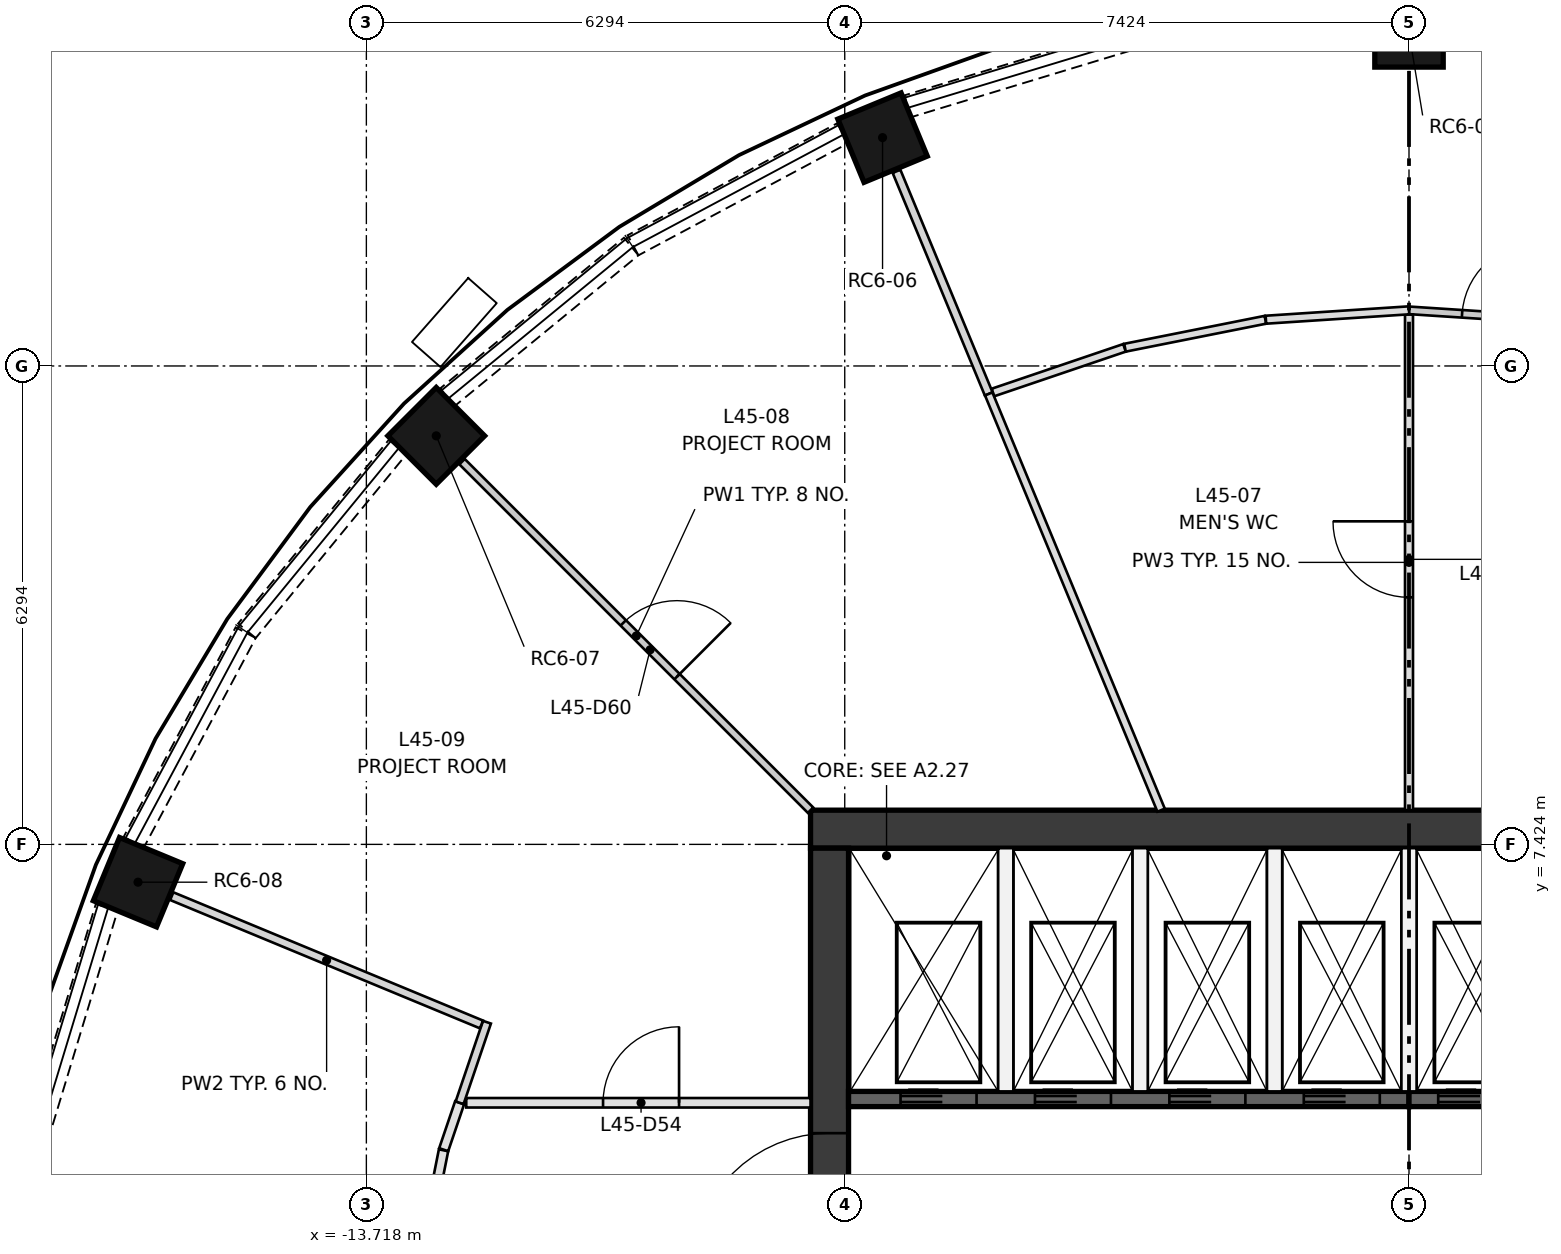
"""IFC4 building model, lengths in metres.
Left out: names, types, materials, properties, quantities, classifications, styles, units other than length and angle.
Written with IfcOpenShell. Run it as: python <this file> out.ifc"""

import sys

from ifc_helpers import new_model, si_unit, direction, frame, frame_2d, origin, origin_2d, place, context, subcontext, project, spatial, rectangle, extrude, element, fill, save


model = new_model("IFC4")
c1 = context("Model", 3, precision=1e-05, world=origin(), true_north=direction((0.0, 1.0)))
c2 = subcontext(c1, "Body", "Model", "MODEL_VIEW")
j1 = project(units=[si_unit("LENGTHUNIT", "METRE"), si_unit("PLANEANGLEUNIT", "RADIAN")], contexts=[c1])
p1 = place(None, origin())
s1 = spatial("IfcSite", under=j1, at=p1, CompositionType="ELEMENT")
p2 = place(p1, origin())
s2 = spatial("IfcBuilding", under=s1, at=p2, CompositionType="ELEMENT")
p3 = place(p2, frame((0.0, 0.0, 170.9)))
s3 = spatial("IfcBuildingStorey", under=s2, at=p3, CompositionType="ELEMENT", Elevation=170.9)
for number, where, z_axis, x_axis in (
    (1, (0.0, 18.1, 0.0), (0.0, 0.0, 1.0), (0.0, 1.0, 0.0)),
    (2, (-6.927, 16.722, 0.0), (0.0, 0.0, 1.0), (-0.383, 0.924, 0.0)),
    (3, (-12.799, 12.799, 0.0), (0.0, 0.0, 1.0), (-0.707, 0.707, 0.0)),
    (4, (-16.722, 6.927, 0.0), (0.0, 0.0, 1.0), (-0.924, 0.383, 0.0)),
):
    element("IfcColumn", number, at=place(p3, frame(where, z_axis=z_axis, x_axis=x_axis)), inside=s3, PredefinedType="COLUMN", context=c2, shape_type="SweptSolid", body=[
        extrude(rectangle(XDim=0.9, YDim=0.9, at=origin_2d()), origin(), (0.0, 0.0, 1.0), 3.35),
    ])
p4 = place(p3, frame((-7.874, 7.624, 0.0), z_axis=(0.0, 0.0, 1.0), x_axis=(1.0, 0.0, 0.0)))
e5 = element("IfcWall", 5, at=p4, inside=s3, PredefinedType="SHEAR", context=c2, shape_type="SweptSolid", body=[
    extrude(rectangle(XDim=15.748, YDim=0.5, at=frame_2d((7.874, 0.0))), origin(), (0.0, 0.0, 1.0), 3.35),
])
p5 = place(p3, frame((-7.624, -7.374, 0.0), z_axis=(0.0, 0.0, 1.0), x_axis=(0.0, 1.0, 0.0)))
e6 = element("IfcWall", 6, at=p5, inside=s3, PredefinedType="SHEAR", context=c2, shape_type="SweptSolid", body=[
    extrude(rectangle(XDim=14.748, YDim=0.5, at=frame_2d((7.374, 0.0))), origin(), (0.0, 0.0, 1.0), 3.35),
])
p6 = place(p5, frame((6.874, 0.0, 0.0)))
e7 = element("IfcOpeningElement", 7, at=p6, cuts=e6, PredefinedType="OPENING", context=c2, shape_type="SweptSolid", body=[
    extrude(rectangle(XDim=1.0, YDim=2.1, at=frame_2d((0.5, 1.05))), frame((0.0, 0.26, 0.0), z_axis=(0.0, -1.0, 0.0), x_axis=(1.0, 0.0, 0.0)), (0.0, 0.0, 1.0), 0.52),
])
p7 = place(p5, frame((3.75, 0.0, 0.0)))
e8 = element("IfcOpeningElement", 8, at=p7, cuts=e6, PredefinedType="OPENING", context=c2, shape_type="SweptSolid", body=[
    extrude(rectangle(XDim=1.8, YDim=2.1, at=frame_2d((0.9, 1.05))), frame((0.0, 0.26, 0.0), z_axis=(0.0, -1.0, 0.0), x_axis=(1.0, 0.0, 0.0)), (0.0, 0.0, 1.0), 0.52),
])
p8 = place(p5, frame((9.198, 0.0, 0.0)))
e9 = element("IfcOpeningElement", 9, at=p8, cuts=e6, PredefinedType="OPENING", context=c2, shape_type="SweptSolid", body=[
    extrude(rectangle(XDim=1.8, YDim=2.1, at=frame_2d((0.9, 1.05))), frame((0.0, 0.26, 0.0), z_axis=(0.0, -1.0, 0.0), x_axis=(1.0, 0.0, 0.0)), (0.0, 0.0, 1.0), 0.52),
])
p9 = place(p3, frame((-7.374, 4.074, 0.0), z_axis=(0.0, 0.0, 1.0), x_axis=(1.0, 0.0, 0.0)))
e10 = element("IfcWall", 10, at=p9, inside=s3, PredefinedType="SHEAR", context=c2, shape_type="SweptSolid", body=[
    extrude(rectangle(XDim=7.374, YDim=0.2, at=frame_2d((3.687, 0.0))), origin(), (0.0, 0.0, 1.0), 3.0),
])
p10 = place(p9, frame((0.684, 0.0, 0.0)))
e11 = element("IfcOpeningElement", 11, at=p10, cuts=e10, PredefinedType="OPENING", context=c2, shape_type="SweptSolid", body=[
    extrude(rectangle(XDim=1.0, YDim=2.1, at=frame_2d((0.5, 1.05))), frame((0.0, 0.11, 0.0), z_axis=(0.0, -1.0, 0.0), x_axis=(1.0, 0.0, 0.0)), (0.0, 0.0, 1.0), 0.22),
])
p11 = place(p9, frame((2.453, 0.0, 0.0)))
e12 = element("IfcOpeningElement", 12, at=p11, cuts=e10, PredefinedType="OPENING", context=c2, shape_type="SweptSolid", body=[
    extrude(rectangle(XDim=1.0, YDim=2.1, at=frame_2d((0.5, 1.05))), frame((0.0, 0.11, 0.0), z_axis=(0.0, -1.0, 0.0), x_axis=(1.0, 0.0, 0.0)), (0.0, 0.0, 1.0), 0.22),
])
p12 = place(p9, frame((4.221, 0.0, 0.0)))
e13 = element("IfcOpeningElement", 13, at=p12, cuts=e10, PredefinedType="OPENING", context=c2, shape_type="SweptSolid", body=[
    extrude(rectangle(XDim=1.0, YDim=2.1, at=frame_2d((0.5, 1.05))), frame((0.0, 0.11, 0.0), z_axis=(0.0, -1.0, 0.0), x_axis=(1.0, 0.0, 0.0)), (0.0, 0.0, 1.0), 0.22),
])
p13 = place(p9, frame((5.99, 0.0, 0.0)))
e14 = element("IfcOpeningElement", 14, at=p13, cuts=e10, PredefinedType="OPENING", context=c2, shape_type="SweptSolid", body=[
    extrude(rectangle(XDim=1.0, YDim=2.1, at=frame_2d((0.5, 1.05))), frame((0.0, 0.11, 0.0), z_axis=(0.0, -1.0, 0.0), x_axis=(1.0, 0.0, 0.0)), (0.0, 0.0, 1.0), 0.22),
])
p14 = place(p3, frame((0.0, 4.074, 0.0), z_axis=(0.0, 0.0, 1.0), x_axis=(1.0, 0.0, 0.0)))
e15 = element("IfcWall", 15, at=p14, inside=s3, PredefinedType="SHEAR", context=c2, shape_type="SweptSolid", body=[
    extrude(rectangle(XDim=7.374, YDim=0.2, at=frame_2d((3.687, 0.0))), origin(), (0.0, 0.0, 1.0), 3.0),
])
p15 = place(p14, frame((0.384, 0.0, 0.0)))
e16 = element("IfcOpeningElement", 16, at=p15, cuts=e15, PredefinedType="OPENING", context=c2, shape_type="SweptSolid", body=[
    extrude(rectangle(XDim=1.0, YDim=2.1, at=frame_2d((0.5, 1.05))), frame((0.0, 0.11, 0.0), z_axis=(0.0, -1.0, 0.0), x_axis=(1.0, 0.0, 0.0)), (0.0, 0.0, 1.0), 0.22),
])
p16 = place(p14, frame((2.153, 0.0, 0.0)))
e17 = element("IfcOpeningElement", 17, at=p16, cuts=e15, PredefinedType="OPENING", context=c2, shape_type="SweptSolid", body=[
    extrude(rectangle(XDim=1.0, YDim=2.1, at=frame_2d((0.5, 1.05))), frame((0.0, 0.11, 0.0), z_axis=(0.0, -1.0, 0.0), x_axis=(1.0, 0.0, 0.0)), (0.0, 0.0, 1.0), 0.22),
])
p17 = place(p14, frame((3.921, 0.0, 0.0)))
e18 = element("IfcOpeningElement", 18, at=p17, cuts=e15, PredefinedType="OPENING", context=c2, shape_type="SweptSolid", body=[
    extrude(rectangle(XDim=1.0, YDim=2.1, at=frame_2d((0.5, 1.05))), frame((0.0, 0.11, 0.0), z_axis=(0.0, -1.0, 0.0), x_axis=(1.0, 0.0, 0.0)), (0.0, 0.0, 1.0), 0.22),
])
p18 = place(p14, frame((5.79, 0.0, 0.0)))
e19 = element("IfcOpeningElement", 19, at=p18, cuts=e15, PredefinedType="OPENING", context=c2, shape_type="SweptSolid", body=[
    extrude(rectangle(XDim=0.8, YDim=2.1, at=frame_2d((0.4, 1.05))), frame((0.0, 0.11, 0.0), z_axis=(0.0, -1.0, 0.0), x_axis=(1.0, 0.0, 0.0)), (0.0, 0.0, 1.0), 0.22),
])
for number, where, z_axis, x_axis in (
    (20, (-5.305, 4.174, 0.0), (0.0, 0.0, 1.0), (0.0, 1.0, 0.0)),
    (21, (-3.537, 4.174, 0.0), (0.0, 0.0, 1.0), (0.0, 1.0, 0.0)),
    (22, (-1.769, 4.174, 0.0), (0.0, 0.0, 1.0), (0.0, 1.0, 0.0)),
    (23, (0.0, 4.174, 0.0), (0.0, 0.0, 1.0), (0.0, 1.0, 0.0)),
):
    element("IfcWall", number, at=place(p3, frame(where, z_axis=z_axis, x_axis=x_axis)), inside=s3, PredefinedType="PARTITIONING", context=c2, shape_type="SweptSolid", body=[
        extrude(rectangle(XDim=3.2, YDim=0.2, at=frame_2d((1.6, 0.0))), origin(), (0.0, 0.0, 1.0), 3.0),
    ])
p19 = place(p3, frame((-3.604, 18.042, 0.0), z_axis=(0.0, 0.0, 1.0), x_axis=(-0.957001416136, -0.290083245834, 0.0)))
e24 = element("IfcWall", 24, at=p19, inside=s3, PredefinedType="SOLIDWALL", context=c2, shape_type="SweptSolid", body=[
    extrude(rectangle(XDim=3.127, YDim=0.3, at=frame_2d((1.563, 0.0))), origin(), (0.0, 0.0, 1.0), 0.9),
])
p20 = place(p3, frame((-7.452, 16.779, 0.0), z_axis=(0.0, 0.0, 1.0), x_axis=(-0.882024038027, -0.47120441036, 0.0)))
e25 = element("IfcWall", 25, at=p20, inside=s3, PredefinedType="SOLIDWALL", context=c2, shape_type="SweptSolid", body=[
    extrude(rectangle(XDim=3.125, YDim=0.3, at=frame_2d((1.562, 0.0))), origin(), (0.0, 0.0, 1.0), 0.9),
])
for number, where, z_axis, x_axis in (
    (26, (-10.234, 15.29, 0.0), (0.0, 0.0, 1.0), (-0.773, -0.634, 0.0)),
    (27, (-13.306, 12.651, 0.0), (0.0, 0.0, 1.0), (-0.634, -0.773, 0.0)),
):
    element("IfcWall", number, at=place(p3, frame(where, z_axis=z_axis, x_axis=x_axis)), inside=s3, PredefinedType="SOLIDWALL", context=c2, shape_type="SweptSolid", body=[
        extrude(rectangle(XDim=3.127, YDim=0.3, at=frame_2d((1.563, 0.0))), origin(), (0.0, 0.0, 1.0), 0.9),
    ])
p21 = place(p3, frame((-15.306, 10.209, 0.0), z_axis=(0.0, 0.0, 1.0), x_axis=(-0.47120441036, -0.882024038027, 0.0)))
e28 = element("IfcWall", 28, at=p21, inside=s3, PredefinedType="SOLIDWALL", context=c2, shape_type="SweptSolid", body=[
    extrude(rectangle(XDim=3.125, YDim=0.3, at=frame_2d((1.562, 0.0))), origin(), (0.0, 0.0, 1.0), 0.9),
])
p22 = place(p3, frame((-17.135, 6.596, 0.0), z_axis=(0.0, 0.0, 1.0), x_axis=(-0.290083245834, -0.957001416136, 0.0)))
e29 = element("IfcWall", 29, at=p22, inside=s3, PredefinedType="SOLIDWALL", context=c2, shape_type="SweptSolid", body=[
    extrude(rectangle(XDim=3.127, YDim=0.3, at=frame_2d((1.563, 0.0))), origin(), (0.0, 0.0, 1.0), 0.9),
])
p23 = place(p3, frame((-12.404, 4.024, 0.0), z_axis=(0.0, 0.0, 1.0), x_axis=(1.0, 0.0, 0.0)))
e30 = element("IfcWall", 30, at=p23, inside=s3, PredefinedType="PARTITIONING", context=c2, shape_type="SweptSolid", body=[
    extrude(rectangle(XDim=4.53, YDim=0.125, at=frame_2d((2.265, 0.0))), origin(), (0.0, 0.0, 1.0), 3.0),
])
p24 = place(p23, frame((1.8, 0.0, 0.0)))
e31 = element("IfcOpeningElement", 31, at=p24, cuts=e30, PredefinedType="OPENING", context=c2, shape_type="SweptSolid", body=[
    extrude(rectangle(XDim=1.0, YDim=2.1, at=frame_2d((0.5, 1.05))), frame((0.0, 0.073, 0.0), z_axis=(0.0, -1.0, 0.0), x_axis=(1.0, 0.0, 0.0)), (0.0, 0.0, 1.0), 0.145),
])
p25 = place(p3, frame((-13.037, 1.72, 0.0), z_axis=(0.0, 0.0, 1.0), x_axis=(0.195101249107, 0.980783106806, 0.0)))
e32 = element("IfcWall", 32, at=p25, inside=s3, PredefinedType="PARTITIONING", context=c2, shape_type="SweptSolid", body=[
    extrude(rectangle(XDim=1.712, YDim=0.125, at=frame_2d((0.856, 0.0))), origin(), (0.0, 0.0, 1.0), 3.0),
])
p26 = place(p3, frame((-12.701, 3.407, 0.0), z_axis=(0.0, 0.0, 1.0), x_axis=(0.321506357846, 0.946907419902, 0.0)))
e33 = element("IfcWall", 33, at=p26, inside=s3, PredefinedType="PARTITIONING", context=c2, shape_type="SweptSolid", body=[
    extrude(rectangle(XDim=0.652, YDim=0.125, at=frame_2d((0.326, 0.0))), origin(), (0.0, 0.0, 1.0), 3.0),
])
p27 = place(p3, frame((0.0, 14.45, 0.0), z_axis=(0.0, 0.0, 1.0), x_axis=(0.997862900294, -0.065342422802, 0.0)))
e34 = element("IfcWall", 34, at=p27, inside=s3, PredefinedType="PARTITIONING", context=c2, shape_type="SweptSolid", body=[
    extrude(rectangle(XDim=1.887, YDim=0.1, at=frame_2d((0.943, 0.0))), origin(), (0.0, 0.0, 1.0), 3.0),
])
p28 = place(p27, frame((0.7, 0.0, 0.0)))
e35 = element("IfcOpeningElement", 35, at=p28, cuts=e34, PredefinedType="OPENING", context=c2, shape_type="SweptSolid", body=[
    extrude(rectangle(XDim=1.0, YDim=2.1, at=frame_2d((0.5, 1.05))), frame((0.0, 0.06, 0.0), z_axis=(0.0, -1.0, 0.0), x_axis=(1.0, 0.0, 0.0)), (0.0, 0.0, 1.0), 0.12),
])
p29 = place(p3, frame((0.0, 7.874, 0.0), z_axis=(0.0, 0.0, 1.0), x_axis=(0.0, 1.0, 0.0)))
e36 = element("IfcWall", 36, at=p29, inside=s3, PredefinedType="PARTITIONING", context=c2, shape_type="SweptSolid", body=[
    extrude(rectangle(XDim=6.52, YDim=0.105, at=frame_2d((3.26, 0.0))), origin(), (0.0, 0.0, 1.0), 3.0),
])
p30 = place(p29, frame((2.8, 0.0, 0.0)))
e37 = element("IfcOpeningElement", 37, at=p30, cuts=e36, PredefinedType="OPENING", context=c2, shape_type="SweptSolid", body=[
    extrude(rectangle(XDim=1.0, YDim=2.1, at=frame_2d((0.5, 1.05))), frame((0.0, 0.062, 0.0), z_axis=(0.0, -1.0, 0.0), x_axis=(1.0, 0.0, 0.0)), (0.0, 0.0, 1.0), 0.125),
])
p31 = place(p3, frame((-3.743, 13.957, 0.0), z_axis=(0.0, 0.0, 1.0), x_axis=(-0.946932980831, -0.321431065415, 0.0)))
e38 = element("IfcWall", 38, at=p31, inside=s3, PredefinedType="PARTITIONING", context=c2, shape_type="SweptSolid", body=[
    extrude(rectangle(XDim=1.828, YDim=0.105, at=frame_2d((0.914, 0.0))), origin(), (0.0, 0.0, 1.0), 3.0),
])
p32 = place(p3, frame((-1.889, 14.326, 0.0), z_axis=(0.0, 0.0, 1.0), x_axis=(-0.980784560384, -0.195093941763, 0.0)))
e39 = element("IfcWall", 39, at=p32, inside=s3, PredefinedType="PARTITIONING", context=c2, shape_type="SweptSolid", body=[
    extrude(rectangle(XDim=1.883, YDim=0.105, at=frame_2d((0.942, 0.0))), origin(), (0.0, 0.0, 1.0), 3.0),
])
p33 = place(p3, frame((0.0, 14.45, 0.0), z_axis=(0.0, 0.0, 1.0), x_axis=(-0.997862900294, -0.065342422802, 0.0)))
e40 = element("IfcWall", 40, at=p33, inside=s3, PredefinedType="PARTITIONING", context=c2, shape_type="SweptSolid", body=[
    extrude(rectangle(XDim=1.887, YDim=0.105, at=frame_2d((0.943, 0.0))), origin(), (0.0, 0.0, 1.0), 3.0),
])
p34 = place(p3, frame((-5.53, 13.35, 0.0), z_axis=(0.0, 0.0, 1.0), x_axis=(-0.382689618566, 0.923876970079, 0.0)))
e41 = element("IfcWall", 41, at=p34, inside=s3, PredefinedType="PARTITIONING", context=c2, shape_type="SweptSolid", body=[
    extrude(rectangle(XDim=3.17, YDim=0.11, at=frame_2d((1.585, 0.0))), origin(), (0.0, 0.0, 1.0), 3.0),
])
p35 = place(p3, frame((-3.261, 7.874, 0.0), z_axis=(0.0, 0.0, 1.0), x_axis=(-0.382690105068, 0.923876768559, 0.0)))
e42 = element("IfcWall", 42, at=p35, inside=s3, PredefinedType="PARTITIONING", context=c2, shape_type="SweptSolid", body=[
    extrude(rectangle(XDim=5.927, YDim=0.105, at=frame_2d((2.964, 0.0))), origin(), (0.0, 0.0, 1.0), 3.0),
])
p36 = place(p3, frame((-12.459, 12.459, 0.0), z_axis=(0.0, 0.0, 1.0), x_axis=(0.707106781187, -0.707106781187, 0.0)))
e43 = element("IfcWall", 43, at=p36, inside=s3, PredefinedType="PARTITIONING", context=c2, shape_type="SweptSolid", body=[
    extrude(rectangle(XDim=6.484, YDim=0.1, at=frame_2d((3.242, 0.0))), origin(), (0.0, 0.0, 1.0), 3.0),
])
p37 = place(p36, frame((3.0, 0.0, 0.0)))
e44 = element("IfcOpeningElement", 44, at=p37, cuts=e43, PredefinedType="OPENING", context=c2, shape_type="SweptSolid", body=[
    extrude(rectangle(XDim=1.0, YDim=2.1, at=frame_2d((0.5, 1.05))), frame((0.0, 0.06, 0.0), z_axis=(0.0, -1.0, 0.0), x_axis=(1.0, 0.0, 0.0)), (0.0, 0.0, 1.0), 0.12),
])
p38 = place(p3, frame((-12.491, 4.024, 0.0), z_axis=(0.0, 0.0, 1.0), x_axis=(0.321456988234, 0.946924181081, 0.0)))
e45 = element("IfcWall", 45, at=p38, inside=s3, PredefinedType="PARTITIONING", context=c2, shape_type="SweptSolid", body=[
    extrude(rectangle(XDim=1.119, YDim=0.11, at=frame_2d((0.56, 0.0))), origin(), (0.0, 0.0, 1.0), 3.0),
])
p39 = place(p3, frame((-12.203, 5.055, 0.0), z_axis=(0.0, 0.0, 1.0), x_axis=(-0.923869102729, 0.382708611117, 0.0)))
e46 = element("IfcWall", 46, at=p39, inside=s3, PredefinedType="PARTITIONING", context=c2, shape_type="SweptSolid", body=[
    extrude(rectangle(XDim=4.411, YDim=0.11, at=frame_2d((2.206, 0.0))), origin(), (0.0, 0.0, 1.0), 3.0),
])
p40 = place(p10, frame((1.0, 0.0, 0.0), z_axis=(0.0, 0.0, 1.0), x_axis=(-1.0, 0.0, 0.0)))
e47 = element("IfcDoor", 47, at=p40, inside=s3, OperationType="DOUBLE_DOOR_SLIDING", PredefinedType="DOOR", context=c2, shape_type="SweptSolid", body=[
    extrude(rectangle(XDim=1.0, YDim=2.1, at=frame_2d((0.5, 1.05))), frame((0.0, 0.025, 0.0), z_axis=(0.0, -1.0, 0.0), x_axis=(1.0, 0.0, 0.0)), (0.0, 0.0, 1.0), 0.05),
])
fill(e11, e47)
p41 = place(p11, frame((1.0, 0.0, 0.0), z_axis=(0.0, 0.0, 1.0), x_axis=(-1.0, 0.0, 0.0)))
e48 = element("IfcDoor", 48, at=p41, inside=s3, OperationType="DOUBLE_DOOR_SLIDING", PredefinedType="DOOR", context=c2, shape_type="SweptSolid", body=[
    extrude(rectangle(XDim=1.0, YDim=2.1, at=frame_2d((0.5, 1.05))), frame((0.0, 0.025, 0.0), z_axis=(0.0, -1.0, 0.0), x_axis=(1.0, 0.0, 0.0)), (0.0, 0.0, 1.0), 0.05),
])
fill(e12, e48)
p42 = place(p12, frame((1.0, 0.0, 0.0), z_axis=(0.0, 0.0, 1.0), x_axis=(-1.0, 0.0, 0.0)))
e49 = element("IfcDoor", 49, at=p42, inside=s3, OperationType="DOUBLE_DOOR_SLIDING", PredefinedType="DOOR", context=c2, shape_type="SweptSolid", body=[
    extrude(rectangle(XDim=1.0, YDim=2.1, at=frame_2d((0.5, 1.05))), frame((0.0, 0.025, 0.0), z_axis=(0.0, -1.0, 0.0), x_axis=(1.0, 0.0, 0.0)), (0.0, 0.0, 1.0), 0.05),
])
fill(e13, e49)
p43 = place(p13, frame((1.0, 0.0, 0.0), z_axis=(0.0, 0.0, 1.0), x_axis=(-1.0, 0.0, 0.0)))
e50 = element("IfcDoor", 50, at=p43, inside=s3, OperationType="DOUBLE_DOOR_SLIDING", PredefinedType="DOOR", context=c2, shape_type="SweptSolid", body=[
    extrude(rectangle(XDim=1.0, YDim=2.1, at=frame_2d((0.5, 1.05))), frame((0.0, 0.025, 0.0), z_axis=(0.0, -1.0, 0.0), x_axis=(1.0, 0.0, 0.0)), (0.0, 0.0, 1.0), 0.05),
])
fill(e14, e50)
p44 = place(p15, frame((1.0, 0.0, 0.0), z_axis=(0.0, 0.0, 1.0), x_axis=(-1.0, 0.0, 0.0)))
e51 = element("IfcDoor", 51, at=p44, inside=s3, OperationType="DOUBLE_DOOR_SLIDING", PredefinedType="DOOR", context=c2, shape_type="SweptSolid", body=[
    extrude(rectangle(XDim=1.0, YDim=2.1, at=frame_2d((0.5, 1.05))), frame((0.0, 0.025, 0.0), z_axis=(0.0, -1.0, 0.0), x_axis=(1.0, 0.0, 0.0)), (0.0, 0.0, 1.0), 0.05),
])
fill(e16, e51)
p45 = place(p8, origin())
e52 = element("IfcDoor", 52, at=p45, inside=s3, OperationType="DOUBLE_DOOR_SINGLE_SWING", PredefinedType="DOOR", context=c2, shape_type="SweptSolid", body=[
    extrude(rectangle(XDim=1.8, YDim=2.1, at=frame_2d((0.9, 1.05))), frame((0.0, 0.025, 0.0), z_axis=(0.0, -1.0, 0.0), x_axis=(1.0, 0.0, 0.0)), (0.0, 0.0, 1.0), 0.05),
])
fill(e9, e52)
p46 = place(p24, origin())
e53 = element("IfcDoor", 53, at=p46, inside=s3, OperationType="SINGLE_SWING_RIGHT", PredefinedType="DOOR", context=c2, shape_type="SweptSolid", body=[
    extrude(rectangle(XDim=1.0, YDim=2.1, at=frame_2d((0.5, 1.05))), frame((0.0, 0.025, 0.0), z_axis=(0.0, -1.0, 0.0), x_axis=(1.0, 0.0, 0.0)), (0.0, 0.0, 1.0), 0.05),
])
fill(e31, e53)
p47 = place(p28, origin())
e54 = element("IfcDoor", 54, at=p47, inside=s3, OperationType="SINGLE_SWING_RIGHT", PredefinedType="DOOR", context=c2, shape_type="SweptSolid", body=[
    extrude(rectangle(XDim=1.0, YDim=2.1, at=frame_2d((0.5, 1.05))), frame((0.0, 0.025, 0.0), z_axis=(0.0, -1.0, 0.0), x_axis=(1.0, 0.0, 0.0)), (0.0, 0.0, 1.0), 0.05),
])
fill(e35, e54)
p48 = place(p30, origin())
e55 = element("IfcDoor", 55, at=p48, inside=s3, OperationType="SINGLE_SWING_RIGHT", PredefinedType="DOOR", context=c2, shape_type="SweptSolid", body=[
    extrude(rectangle(XDim=1.0, YDim=2.1, at=frame_2d((0.5, 1.05))), frame((0.0, 0.025, 0.0), z_axis=(0.0, -1.0, 0.0), x_axis=(1.0, 0.0, 0.0)), (0.0, 0.0, 1.0), 0.05),
])
fill(e37, e55)
p49 = place(p37, origin())
e56 = element("IfcDoor", 56, at=p49, inside=s3, OperationType="SINGLE_SWING_RIGHT", PredefinedType="DOOR", context=c2, shape_type="SweptSolid", body=[
    extrude(rectangle(XDim=1.0, YDim=2.1, at=frame_2d((0.5, 1.05))), frame((0.0, 0.025, 0.0), z_axis=(0.0, -1.0, 0.0), x_axis=(1.0, 0.0, 0.0)), (0.0, 0.0, 1.0), 0.05),
])
fill(e44, e56)
save(model, sys.argv[1])
